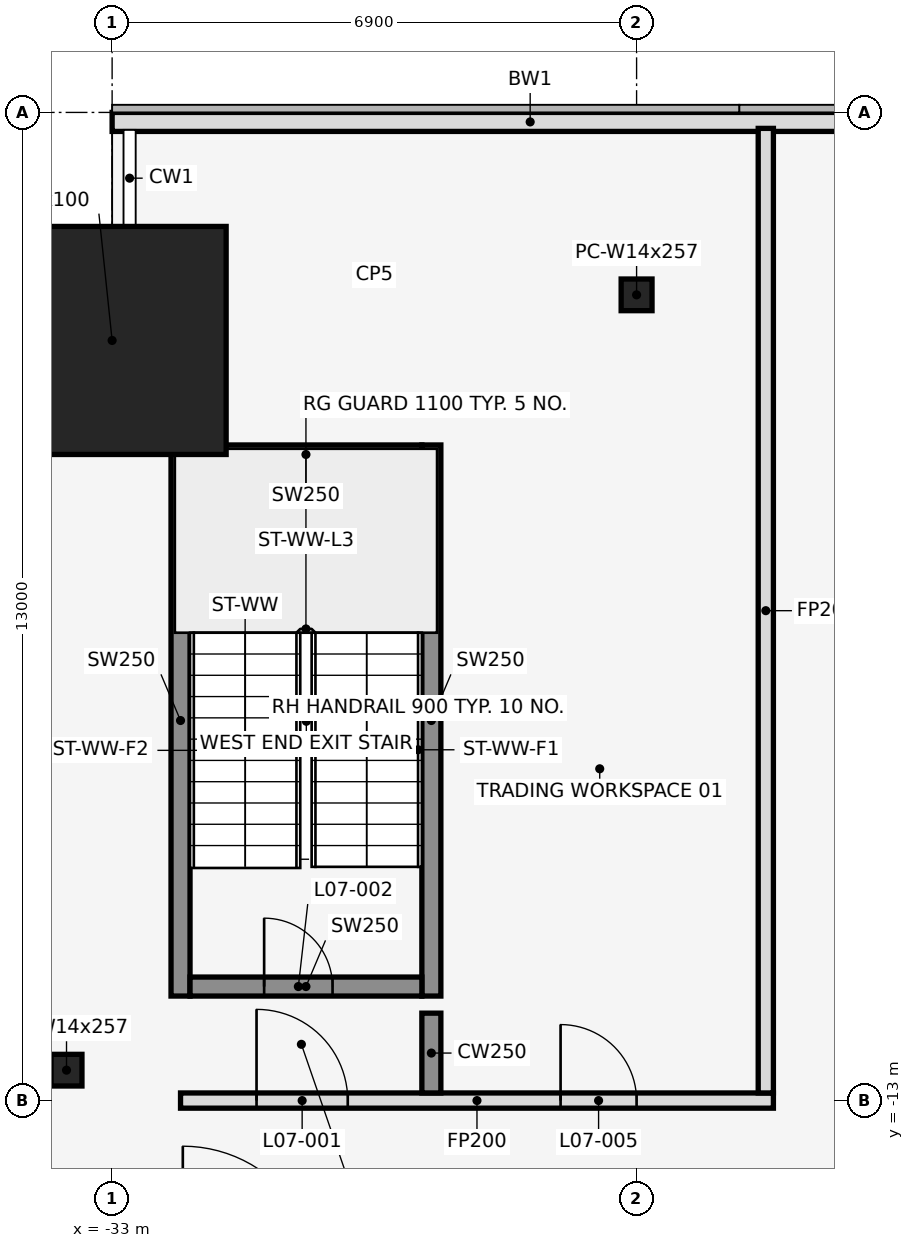
"""IFC4 building model, lengths in metres.
Left out: names, types, materials, properties, quantities, classifications, styles, units other than length and angle.
Written with IfcOpenShell. Run it as: python <this file> out.ifc"""

import sys

from ifc_helpers import new_model, si_unit, direction, frame, frame_2d, origin, origin_2d, place, context, subcontext, project, spatial, rectangle, hollow_rectangle, i_section, extrude, element, fill, save


model = new_model("IFC4")
c1 = context("Model", 3, precision=1e-05, world=origin(), true_north=direction((0.0, 1.0)))
c2 = subcontext(c1, "Body", "Model", "MODEL_VIEW")
j1 = project(units=[si_unit("LENGTHUNIT", "METRE"), si_unit("PLANEANGLEUNIT", "RADIAN")], contexts=[c1])
p1 = place(None, origin())
s1 = spatial("IfcSite", under=j1, at=p1, CompositionType="ELEMENT")
p2 = place(p1, origin())
s2 = spatial("IfcBuilding", under=s1, at=p2, CompositionType="ELEMENT")
p3 = place(p2, frame((0.0, 0.0, 39.5)))
s3 = spatial("IfcBuildingStorey", under=s2, at=p3, CompositionType="ELEMENT", Elevation=39.5)
p4 = place(p3, frame((-33.0, -3.0, 0.0), z_axis=(0.0, 0.0, 1.0), x_axis=(1.0, 0.0, 0.0)))
e1 = element("IfcColumn", 1, at=p4, inside=s3, PredefinedType="COLUMN", context=c2, shape_type="SweptSolid", body=[
    extrude(hollow_rectangle(XDim=3.0, YDim=3.0, WallThickness=0.1, at=origin_2d()), origin(), (0.0, 0.0, 1.0), 4.5),
])
for number, where, z_axis, x_axis in (
    (2, (-26.1, -2.4, 0.0), (0.0, 0.0, 1.0), (1.0, 0.0, 0.0)),
    (3, (-33.6, -12.6, 0.0), (0.0, 0.0, 1.0), (1.0, 0.0, 0.0)),
):
    element("IfcColumn", number, at=place(p3, frame(where, z_axis=z_axis, x_axis=x_axis)), inside=s3, PredefinedType="COLUMN", context=c2, shape_type="SweptSolid", body=[
        extrude(i_section(OverallWidth=0.406, OverallDepth=0.417, WebThickness=0.03, FlangeThickness=0.048, at=origin_2d()), origin(), (0.0, 0.0, 1.0), 4.5),
    ])
p5 = place(p3, frame((-22.0, -0.125, 0.0), z_axis=(0.0, 0.0, 1.0), x_axis=(-1.0, 0.0, 0.0)))
e4 = element("IfcWall", 4, at=p5, inside=s3, PredefinedType="STANDARD", context=c2, shape_type="SweptSolid", body=[
    extrude(rectangle(XDim=11.0, YDim=0.25, at=frame_2d((5.5, 0.0))), origin(), (0.0, 0.0, 1.0), 4.35),
])
for number, where, z_axis, x_axis in (
    (5, (-32.1, -11.625, 0.0), (0.0, 0.0, 1.0), (0.0, 1.0, 0.0)),
    (6, (-28.8, -11.625, 0.0), (0.0, 0.0, 1.0), (0.0, 1.0, 0.0)),
):
    element("IfcWall", number, at=place(p3, frame(where, z_axis=z_axis, x_axis=x_axis)), inside=s3, PredefinedType="SHEAR", context=c2, shape_type="SweptSolid", body=[
        extrude(rectangle(XDim=7.25, YDim=0.25, at=frame_2d((3.625, 0.0))), origin(), (0.0, 0.0, 1.0), 4.5),
    ])
p6 = place(p3, frame((-31.975, -11.5, 0.0), z_axis=(0.0, 0.0, 1.0), x_axis=(1.0, 0.0, 0.0)))
e7 = element("IfcWall", 7, at=p6, inside=s3, PredefinedType="SHEAR", context=c2, shape_type="SweptSolid", body=[
    extrude(rectangle(XDim=3.05, YDim=0.25, at=frame_2d((1.525, 0.0))), origin(), (0.0, 0.0, 1.0), 4.5),
])
p7 = place(p6, frame((0.975, 0.0, 0.0)))
e8 = element("IfcOpeningElement", 8, at=p7, cuts=e7, PredefinedType="OPENING", context=c2, shape_type="SweptSolid", body=[
    extrude(rectangle(XDim=0.9, YDim=2.1, at=frame_2d((0.45, 1.05))), frame((0.0, 0.137, 0.0), z_axis=(0.0, -1.0, 0.0), x_axis=(1.0, 0.0, 0.0)), (0.0, 0.0, 1.0), 0.274),
])
p8 = place(p3, frame((-31.975, -4.5, 0.0), z_axis=(0.0, 0.0, 1.0), x_axis=(1.0, 0.0, 0.0)))
e9 = element("IfcWall", 9, at=p8, inside=s3, PredefinedType="SHEAR", context=c2, shape_type="SweptSolid", body=[
    extrude(rectangle(XDim=3.05, YDim=0.25, at=frame_2d((1.525, 0.0))), origin(), (0.0, 0.0, 1.0), 4.5),
])
p9 = place(p3, frame((-32.1, -13.0, 0.0), z_axis=(0.0, 0.0, 1.0), x_axis=(1.0, 0.0, 0.0)))
e10 = element("IfcWall", 10, at=p9, inside=s3, PredefinedType="PARTITIONING", context=c2, shape_type="SweptSolid", body=[
    extrude(rectangle(XDim=7.8, YDim=0.2, at=frame_2d((3.9, 0.0))), origin(), (0.0, 0.0, 1.0), 3.418),
])
p10 = place(p9, frame((1.0, 0.0, 0.0)))
e11 = element("IfcOpeningElement", 11, at=p10, cuts=e10, PredefinedType="OPENING", context=c2, shape_type="SweptSolid", body=[
    extrude(rectangle(XDim=1.2, YDim=2.1, at=frame_2d((0.6, 1.05))), frame((0.0, 0.112, 0.0), z_axis=(0.0, -1.0, 0.0), x_axis=(1.0, 0.0, 0.0)), (0.0, 0.0, 1.0), 0.224),
])
p11 = place(p9, frame((5.0, 0.0, 0.0)))
e12 = element("IfcOpeningElement", 12, at=p11, cuts=e10, PredefinedType="OPENING", context=c2, shape_type="SweptSolid", body=[
    extrude(rectangle(XDim=1.0, YDim=2.1, at=frame_2d((0.5, 1.05))), frame((0.0, 0.112, 0.0), z_axis=(0.0, -1.0, 0.0), x_axis=(1.0, 0.0, 0.0)), (0.0, 0.0, 1.0), 0.224),
])
p12 = place(p3, frame((-28.8, -12.9, 0.0), z_axis=(0.0, 0.0, 1.0), x_axis=(0.0, 1.0, 0.0)))
e13 = element("IfcWall", 13, at=p12, inside=s3, PredefinedType="SHEAR", context=c2, shape_type="SweptSolid", body=[
    extrude(rectangle(XDim=1.05, YDim=0.25, at=frame_2d((0.525, 0.0))), origin(), (0.0, 0.0, 1.0), 4.5),
])
p13 = place(p3, frame((-24.4, -12.9, 0.0), z_axis=(0.0, 0.0, 1.0), x_axis=(0.0, 1.0, 0.0)))
e14 = element("IfcWall", 14, at=p13, inside=s3, PredefinedType="PARTITIONING", context=c2, shape_type="SweptSolid", body=[
    extrude(rectangle(XDim=12.69, YDim=0.2, at=frame_2d((6.345, 0.0))), origin(), (0.0, 0.0, 1.0), 3.418),
])
p14 = place(p10, origin())
e15 = element("IfcDoor", 15, at=p14, inside=s3, OperationType="SINGLE_SWING_LEFT", PredefinedType="DOOR", context=c2, shape_type="SweptSolid", body=[
    extrude(rectangle(XDim=1.2, YDim=2.1, at=frame_2d((0.6, 1.05))), frame((0.0, 0.025, 0.0), z_axis=(0.0, -1.0, 0.0), x_axis=(1.0, 0.0, 0.0)), (0.0, 0.0, 1.0), 0.05),
])
fill(e11, e15)
p15 = place(p7, origin())
e16 = element("IfcDoor", 16, at=p15, inside=s3, OperationType="SINGLE_SWING_LEFT", PredefinedType="DOOR", context=c2, shape_type="SweptSolid", body=[
    extrude(rectangle(XDim=0.9, YDim=2.1, at=frame_2d((0.45, 1.05))), frame((0.0, 0.025, 0.0), z_axis=(0.0, -1.0, 0.0), x_axis=(1.0, 0.0, 0.0)), (0.0, 0.0, 1.0), 0.05),
])
fill(e8, e16)
p16 = place(p11, origin())
e17 = element("IfcDoor", 17, at=p16, inside=s3, OperationType="SINGLE_SWING_LEFT", PredefinedType="DOOR", context=c2, shape_type="SweptSolid", body=[
    extrude(rectangle(XDim=1.0, YDim=2.1, at=frame_2d((0.5, 1.05))), frame((0.0, 0.025, 0.0), z_axis=(0.0, -1.0, 0.0), x_axis=(1.0, 0.0, 0.0)), (0.0, 0.0, 1.0), 0.05),
])
fill(e12, e17)
save(model, sys.argv[1])
